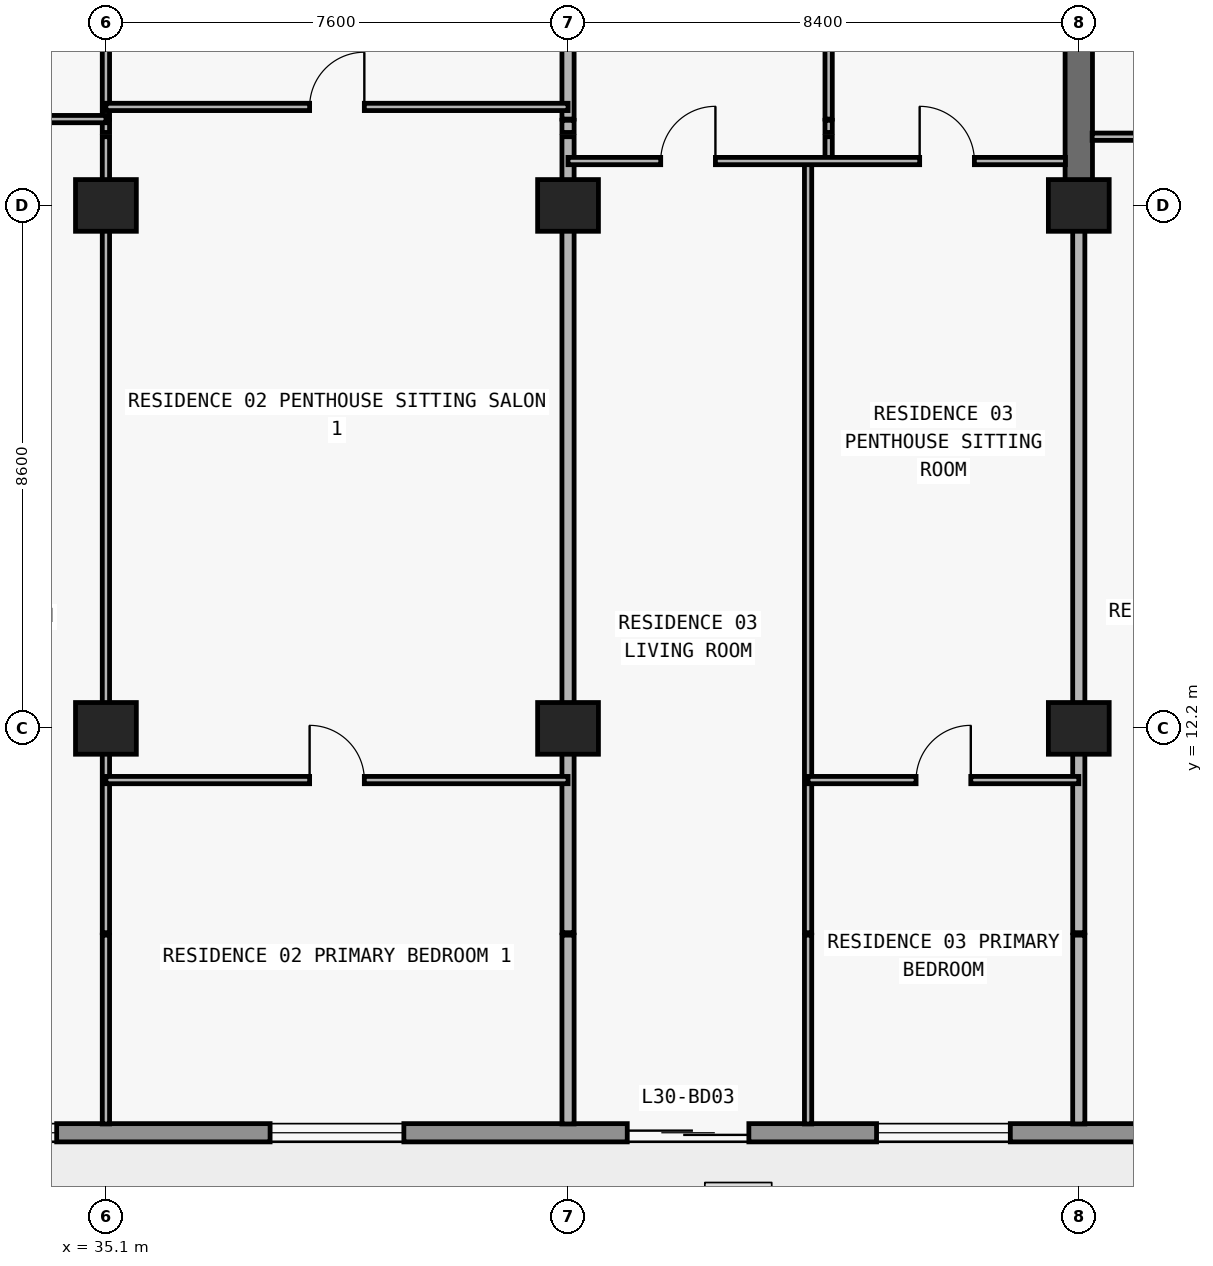
"""IFC4 building model, lengths in metres.
Left out: names, types, materials, properties, quantities, classifications, styles, units other than length and angle.
Written with IfcOpenShell. Run it as: python <this file> out.ifc"""

import sys

from ifc_helpers import new_model, si_unit, direction, frame, frame_2d, origin, origin_2d, place, context, subcontext, project, spatial, rectangle, extrude, element, fill, save


model = new_model("IFC4")
c1 = context("Model", 3, precision=1e-05, world=origin(), true_north=direction((0.0, 1.0)))
c2 = subcontext(c1, "Body", "Model", "MODEL_VIEW")
j1 = project(units=[si_unit("LENGTHUNIT", "METRE"), si_unit("PLANEANGLEUNIT", "RADIAN")], contexts=[c1])
p1 = place(None, origin())
s1 = spatial("IfcSite", under=j1, at=p1, CompositionType="ELEMENT")
p2 = place(p1, origin())
s2 = spatial("IfcBuilding", under=s1, at=p2, CompositionType="ELEMENT")
p3 = place(p2, frame((0.0, 0.0, 112.5)))
s3 = spatial("IfcBuildingStorey", under=s2, at=p3, CompositionType="ELEMENT", Elevation=112.5)
for number, where, z_axis, x_axis in (
    (1, (35.1, 12.2, 0.0), (0.0, 0.0, 1.0), (1.0, 0.0, 0.0)),
    (2, (42.7, 12.2, 0.0), (0.0, 0.0, 1.0), (1.0, 0.0, 0.0)),
    (3, (51.1, 12.2, 0.0), (0.0, 0.0, 1.0), (1.0, 0.0, 0.0)),
    (4, (35.1, 20.8, 0.0), (0.0, 0.0, 1.0), (1.0, 0.0, 0.0)),
    (5, (42.7, 20.8, 0.0), (0.0, 0.0, 1.0), (1.0, 0.0, 0.0)),
    (6, (51.1, 20.8, 0.0), (0.0, 0.0, 1.0), (1.0, 0.0, 0.0)),
):
    element("IfcColumn", number, at=place(p3, frame(where, z_axis=z_axis, x_axis=x_axis)), inside=s3, PredefinedType="COLUMN", context=c2, shape_type="SweptSolid", body=[
        extrude(rectangle(XDim=1.0, YDim=0.85, at=origin_2d()), origin(), (0.0, 0.0, 1.0), 3.05),
    ])
p4 = place(p3, frame((51.1, 20.8, 0.0), z_axis=(0.0, 0.0, 1.0), x_axis=(0.0, 1.0, 0.0)))
e7 = element("IfcWall", 7, at=p4, inside=s3, PredefinedType="SHEAR", context=c2, shape_type="SweptSolid", body=[
    extrude(rectangle(XDim=8.6, YDim=0.45, at=frame_2d((4.3, 0.0))), origin(), (0.0, 0.0, 1.0), 3.05),
])
p5 = place(p3, frame((70.1, 5.55, 0.0), z_axis=(0.0, 0.0, 1.0), x_axis=(-1.0, 0.0, 0.0)))
e8 = element("IfcWall", 8, at=p5, inside=s3, PredefinedType="STANDARD", context=c2, shape_type="SweptSolid", body=[
    extrude(rectangle(XDim=62.4, YDim=0.3, at=frame_2d((31.2, 0.0))), origin(), (0.0, 0.0, 1.0), 3.05),
])
p6 = place(p5, frame((57.29, 0.0, 0.0)))
e9 = element("IfcOpeningElement", 9, at=p6, cuts=e8, PredefinedType="OPENING", context=c2, shape_type="SweptSolid", body=[
    extrude(rectangle(XDim=2.0, YDim=2.3, at=frame_2d((1.0, 1.15))), frame((0.0, 0.16, 0.0), z_axis=(0.0, -1.0, 0.0), x_axis=(1.0, 0.0, 0.0)), (0.0, 0.0, 1.0), 0.32),
])
p7 = place(p5, frame((52.61, 0.0, 0.65)))
e10 = element("IfcOpeningElement", 10, at=p7, cuts=e8, PredefinedType="OPENING", context=c2, shape_type="SweptSolid", body=[
    extrude(rectangle(XDim=2.6, YDim=1.85, at=frame_2d((1.3, 0.925))), frame((0.0, 0.16, 0.0), z_axis=(0.0, -1.0, 0.0), x_axis=(1.0, 0.0, 0.0)), (0.0, 0.0, 1.0), 0.32),
])
p8 = place(p5, frame((46.5, 0.0, 0.85)))
e11 = element("IfcOpeningElement", 11, at=p8, cuts=e8, PredefinedType="OPENING", context=c2, shape_type="SweptSolid", body=[
    extrude(rectangle(XDim=2.2, YDim=1.55, at=frame_2d((1.1, 0.775))), frame((0.0, 0.16, 0.0), z_axis=(0.0, -1.0, 0.0), x_axis=(1.0, 0.0, 0.0)), (0.0, 0.0, 1.0), 0.32),
])
p9 = place(p5, frame((40.49, 0.0, 0.0)))
e12 = element("IfcOpeningElement", 12, at=p9, cuts=e8, PredefinedType="OPENING", context=c2, shape_type="SweptSolid", body=[
    extrude(rectangle(XDim=2.0, YDim=2.3, at=frame_2d((1.0, 1.15))), frame((0.0, 0.16, 0.0), z_axis=(0.0, -1.0, 0.0), x_axis=(1.0, 0.0, 0.0)), (0.0, 0.0, 1.0), 0.32),
])
p10 = place(p5, frame((35.81, 0.0, 0.65)))
e13 = element("IfcOpeningElement", 13, at=p10, cuts=e8, PredefinedType="OPENING", context=c2, shape_type="SweptSolid", body=[
    extrude(rectangle(XDim=2.6, YDim=1.85, at=frame_2d((1.3, 0.925))), frame((0.0, 0.16, 0.0), z_axis=(0.0, -1.0, 0.0), x_axis=(1.0, 0.0, 0.0)), (0.0, 0.0, 1.0), 0.32),
])
p11 = place(p5, frame((30.1, 0.0, 0.85)))
e14 = element("IfcOpeningElement", 14, at=p11, cuts=e8, PredefinedType="OPENING", context=c2, shape_type="SweptSolid", body=[
    extrude(rectangle(XDim=2.2, YDim=1.55, at=frame_2d((1.1, 0.775))), frame((0.0, 0.16, 0.0), z_axis=(0.0, -1.0, 0.0), x_axis=(1.0, 0.0, 0.0)), (0.0, 0.0, 1.0), 0.32),
])
p12 = place(p5, frame((24.426, 0.0, 0.0)))
e15 = element("IfcOpeningElement", 15, at=p12, cuts=e8, PredefinedType="OPENING", context=c2, shape_type="SweptSolid", body=[
    extrude(rectangle(XDim=2.0, YDim=2.3, at=frame_2d((1.0, 1.15))), frame((0.0, 0.16, 0.0), z_axis=(0.0, -1.0, 0.0), x_axis=(1.0, 0.0, 0.0)), (0.0, 0.0, 1.0), 0.32),
])
p13 = place(p5, frame((20.126, 0.0, 0.85)))
e16 = element("IfcOpeningElement", 16, at=p13, cuts=e8, PredefinedType="OPENING", context=c2, shape_type="SweptSolid", body=[
    extrude(rectangle(XDim=2.2, YDim=1.55, at=frame_2d((1.1, 0.775))), frame((0.0, 0.16, 0.0), z_axis=(0.0, -1.0, 0.0), x_axis=(1.0, 0.0, 0.0)), (0.0, 0.0, 1.0), 0.32),
])
p14 = place(p5, frame((15.69, 0.0, 0.0)))
e17 = element("IfcOpeningElement", 17, at=p14, cuts=e8, PredefinedType="OPENING", context=c2, shape_type="SweptSolid", body=[
    extrude(rectangle(XDim=2.0, YDim=2.3, at=frame_2d((1.0, 1.15))), frame((0.0, 0.16, 0.0), z_axis=(0.0, -1.0, 0.0), x_axis=(1.0, 0.0, 0.0)), (0.0, 0.0, 1.0), 0.32),
])
p15 = place(p5, frame((11.59, 0.0, 0.85)))
e18 = element("IfcOpeningElement", 18, at=p15, cuts=e8, PredefinedType="OPENING", context=c2, shape_type="SweptSolid", body=[
    extrude(rectangle(XDim=1.8, YDim=1.55, at=frame_2d((0.9, 0.775))), frame((0.0, 0.16, 0.0), z_axis=(0.0, -1.0, 0.0), x_axis=(1.0, 0.0, 0.0)), (0.0, 0.0, 1.0), 0.32),
])
p16 = place(p5, frame((7.626, 0.0, 0.0)))
e19 = element("IfcOpeningElement", 19, at=p16, cuts=e8, PredefinedType="OPENING", context=c2, shape_type="SweptSolid", body=[
    extrude(rectangle(XDim=2.0, YDim=2.3, at=frame_2d((1.0, 1.15))), frame((0.0, 0.16, 0.0), z_axis=(0.0, -1.0, 0.0), x_axis=(1.0, 0.0, 0.0)), (0.0, 0.0, 1.0), 0.32),
])
p17 = place(p5, frame((3.326, 0.0, 0.85)))
e20 = element("IfcOpeningElement", 20, at=p17, cuts=e8, PredefinedType="OPENING", context=c2, shape_type="SweptSolid", body=[
    extrude(rectangle(XDim=2.2, YDim=1.55, at=frame_2d((1.1, 0.775))), frame((0.0, 0.16, 0.0), z_axis=(0.0, -1.0, 0.0), x_axis=(1.0, 0.0, 0.0)), (0.0, 0.0, 1.0), 0.32),
])
p18 = place(p3, frame((35.1, 5.695, 0.0), z_axis=(0.0, 0.0, 1.0), x_axis=(0.0, 1.0, 0.0)))
e21 = element("IfcWall", 21, at=p18, inside=s3, PredefinedType="PARTITIONING", context=c2, shape_type="SweptSolid", body=[
    extrude(rectangle(XDim=3.105, YDim=0.12, at=frame_2d((1.552, 0.0))), origin(), (0.0, 0.0, 1.0), 3.05),
])
p19 = place(p3, frame((35.1, 8.84, 0.0), z_axis=(0.0, 0.0, 1.0), x_axis=(0.0, 1.0, 0.0)))
e22 = element("IfcWall", 22, at=p19, inside=s3, PredefinedType="PARTITIONING", context=c2, shape_type="SweptSolid", body=[
    extrude(rectangle(XDim=13.09, YDim=0.12, at=frame_2d((6.545, 0.0))), origin(), (0.0, 0.0, 1.0), 2.174),
])
p20 = place(p3, frame((35.1, 22.0, 0.0), z_axis=(0.0, 0.0, 1.0), x_axis=(0.0, 1.0, 0.0)))
e23 = element("IfcWall", 23, at=p20, inside=s3, PredefinedType="PARTITIONING", context=c2, shape_type="SweptSolid", body=[
    extrude(rectangle(XDim=0.2, YDim=0.12, at=frame_2d((0.1, 0.0))), origin(), (0.0, 0.0, 1.0), 2.174),
])
p21 = place(p3, frame((35.1, 22.22, 0.0), z_axis=(0.0, 0.0, 1.0), x_axis=(0.0, 1.0, 0.0)))
e24 = element("IfcWall", 24, at=p21, inside=s3, PredefinedType="PARTITIONING", context=c2, shape_type="SweptSolid", body=[
    extrude(rectangle(XDim=4.38, YDim=0.12, at=frame_2d((2.19, 0.0))), origin(), (0.0, 0.0, 1.0), 2.174),
])
p22 = place(p21, frame((1.84, 0.0, 0.0)))
e25 = element("IfcOpeningElement", 25, at=p22, cuts=e24, PredefinedType="OPENING", context=c2, shape_type="SweptSolid", body=[
    extrude(rectangle(XDim=0.9, YDim=2.124, at=frame_2d((0.45, 1.062))), frame((0.0, 0.07, 0.0), z_axis=(0.0, -1.0, 0.0), x_axis=(1.0, 0.0, 0.0)), (0.0, 0.0, 1.0), 0.14),
])
p23 = place(p3, frame((42.7, 5.695, 0.0), z_axis=(0.0, 0.0, 1.0), x_axis=(0.0, 1.0, 0.0)))
e26 = element("IfcWall", 26, at=p23, inside=s3, PredefinedType="PARTITIONING", context=c2, shape_type="SweptSolid", body=[
    extrude(rectangle(XDim=3.105, YDim=0.2, at=frame_2d((1.552, 0.0))), origin(), (0.0, 0.0, 1.0), 3.05),
])
p24 = place(p3, frame((42.7, 8.84, 0.0), z_axis=(0.0, 0.0, 1.0), x_axis=(0.0, 1.0, 0.0)))
e27 = element("IfcWall", 27, at=p24, inside=s3, PredefinedType="PARTITIONING", context=c2, shape_type="SweptSolid", body=[
    extrude(rectangle(XDim=13.09, YDim=0.2, at=frame_2d((6.545, 0.0))), origin(), (0.0, 0.0, 1.0), 2.174),
])
p25 = place(p3, frame((42.7, 22.0, 0.0), z_axis=(0.0, 0.0, 1.0), x_axis=(0.0, 1.0, 0.0)))
e28 = element("IfcWall", 28, at=p25, inside=s3, PredefinedType="PARTITIONING", context=c2, shape_type="SweptSolid", body=[
    extrude(rectangle(XDim=0.2, YDim=0.2, at=frame_2d((0.1, 0.0))), origin(), (0.0, 0.0, 1.0), 2.174),
])
p26 = place(p3, frame((42.7, 22.22, 0.0), z_axis=(0.0, 0.0, 1.0), x_axis=(0.0, 1.0, 0.0)))
e29 = element("IfcWall", 29, at=p26, inside=s3, PredefinedType="PARTITIONING", context=c2, shape_type="SweptSolid", body=[
    extrude(rectangle(XDim=4.38, YDim=0.2, at=frame_2d((2.19, 0.0))), origin(), (0.0, 0.0, 1.0), 2.174),
])
p27 = place(p3, frame((46.648, 5.695, 0.0), z_axis=(0.0, 0.0, 1.0), x_axis=(0.0, 1.0, 0.0)))
e30 = element("IfcWall", 30, at=p27, inside=s3, PredefinedType="PARTITIONING", context=c2, shape_type="SweptSolid", body=[
    extrude(rectangle(XDim=3.105, YDim=0.12, at=frame_2d((1.552, 0.0))), origin(), (0.0, 0.0, 1.0), 3.05),
])
p28 = place(p3, frame((46.648, 8.84, 0.0), z_axis=(0.0, 0.0, 1.0), x_axis=(0.0, 1.0, 0.0)))
e31 = element("IfcWall", 31, at=p28, inside=s3, PredefinedType="PARTITIONING", context=c2, shape_type="SweptSolid", body=[
    extrude(rectangle(XDim=12.69, YDim=0.12, at=frame_2d((6.345, 0.0))), origin(), (0.0, 0.0, 1.0), 3.05),
])
p29 = place(p3, frame((46.986, 21.53, 0.0), z_axis=(0.0, 0.0, 1.0), x_axis=(0.0, 1.0, 0.0)))
e32 = element("IfcWall", 32, at=p29, inside=s3, PredefinedType="PARTITIONING", context=c2, shape_type="SweptSolid", body=[
    extrude(rectangle(XDim=0.4, YDim=0.12, at=frame_2d((0.2, 0.0))), origin(), (0.0, 0.0, 1.0), 3.05),
])
p30 = place(p3, frame((46.986, 22.0, 0.0), z_axis=(0.0, 0.0, 1.0), x_axis=(0.0, 1.0, 0.0)))
e33 = element("IfcWall", 33, at=p30, inside=s3, PredefinedType="PARTITIONING", context=c2, shape_type="SweptSolid", body=[
    extrude(rectangle(XDim=0.2, YDim=0.12, at=frame_2d((0.1, 0.0))), origin(), (0.0, 0.0, 1.0), 3.05),
])
p31 = place(p3, frame((46.986, 22.22, 0.0), z_axis=(0.0, 0.0, 1.0), x_axis=(0.0, 1.0, 0.0)))
e34 = element("IfcWall", 34, at=p31, inside=s3, PredefinedType="PARTITIONING", context=c2, shape_type="SweptSolid", body=[
    extrude(rectangle(XDim=4.38, YDim=0.12, at=frame_2d((2.19, 0.0))), origin(), (0.0, 0.0, 1.0), 3.05),
])
p32 = place(p31, frame((1.74, 0.0, 0.0)))
e35 = element("IfcOpeningElement", 35, at=p32, cuts=e34, PredefinedType="OPENING", context=c2, shape_type="SweptSolid", body=[
    extrude(rectangle(XDim=0.9, YDim=2.15, at=frame_2d((0.45, 1.075))), frame((0.0, 0.07, 0.0), z_axis=(0.0, -1.0, 0.0), x_axis=(1.0, 0.0, 0.0)), (0.0, 0.0, 1.0), 0.14),
])
p33 = place(p3, frame((51.1, 5.695, 0.0), z_axis=(0.0, 0.0, 1.0), x_axis=(0.0, 1.0, 0.0)))
e36 = element("IfcWall", 36, at=p33, inside=s3, PredefinedType="PARTITIONING", context=c2, shape_type="SweptSolid", body=[
    extrude(rectangle(XDim=3.105, YDim=0.2, at=frame_2d((1.552, 0.0))), origin(), (0.0, 0.0, 1.0), 3.05),
])
p34 = place(p3, frame((51.1, 8.84, 0.0), z_axis=(0.0, 0.0, 1.0), x_axis=(0.0, 1.0, 0.0)))
e37 = element("IfcWall", 37, at=p34, inside=s3, PredefinedType="PARTITIONING", context=c2, shape_type="SweptSolid", body=[
    extrude(rectangle(XDim=11.955, YDim=0.2, at=frame_2d((5.978, 0.0))), origin(), (0.0, 0.0, 1.0), 2.174),
])
p35 = place(p3, frame((35.1, 11.35, 0.0), z_axis=(0.0, 0.0, 1.0), x_axis=(1.0, 0.0, 0.0)))
e38 = element("IfcWall", 38, at=p35, inside=s3, PredefinedType="PARTITIONING", context=c2, shape_type="SweptSolid", body=[
    extrude(rectangle(XDim=7.6, YDim=0.12, at=frame_2d((3.8, 0.0))), origin(), (0.0, 0.0, 1.0), 3.05),
])
p36 = place(p35, frame((3.35, 0.0, 0.0)))
e39 = element("IfcOpeningElement", 39, at=p36, cuts=e38, PredefinedType="OPENING", context=c2, shape_type="SweptSolid", body=[
    extrude(rectangle(XDim=0.9, YDim=2.15, at=frame_2d((0.45, 1.075))), frame((0.0, 0.07, 0.0), z_axis=(0.0, -1.0, 0.0), x_axis=(1.0, 0.0, 0.0)), (0.0, 0.0, 1.0), 0.14),
])
p37 = place(p3, frame((46.648, 11.35, 0.0), z_axis=(0.0, 0.0, 1.0), x_axis=(1.0, 0.0, 0.0)))
e40 = element("IfcWall", 40, at=p37, inside=s3, PredefinedType="PARTITIONING", context=c2, shape_type="SweptSolid", body=[
    extrude(rectangle(XDim=4.452, YDim=0.12, at=frame_2d((2.226, 0.0))), origin(), (0.0, 0.0, 1.0), 3.05),
])
p38 = place(p37, frame((1.776, 0.0, 0.0)))
e41 = element("IfcOpeningElement", 41, at=p38, cuts=e40, PredefinedType="OPENING", context=c2, shape_type="SweptSolid", body=[
    extrude(rectangle(XDim=0.9, YDim=2.15, at=frame_2d((0.45, 1.075))), frame((0.0, 0.07, 0.0), z_axis=(0.0, -1.0, 0.0), x_axis=(1.0, 0.0, 0.0)), (0.0, 0.0, 1.0), 0.14),
])
p39 = place(p3, frame((42.7, 21.53, 0.0), z_axis=(0.0, 0.0, 1.0), x_axis=(1.0, 0.0, 0.0)))
e42 = element("IfcWall", 42, at=p39, inside=s3, PredefinedType="PARTITIONING", context=c2, shape_type="SweptSolid", body=[
    extrude(rectangle(XDim=8.18, YDim=0.12, at=frame_2d((4.09, 0.0))), origin(), (0.0, 0.0, 1.0), 3.05),
])
p40 = place(p39, frame((1.524, 0.0, 0.0)))
e43 = element("IfcOpeningElement", 43, at=p40, cuts=e42, PredefinedType="OPENING", context=c2, shape_type="SweptSolid", body=[
    extrude(rectangle(XDim=0.9, YDim=2.15, at=frame_2d((0.45, 1.075))), frame((0.0, 0.07, 0.0), z_axis=(0.0, -1.0, 0.0), x_axis=(1.0, 0.0, 0.0)), (0.0, 0.0, 1.0), 0.14),
])
p41 = place(p39, frame((5.783, 0.0, 0.0)))
e44 = element("IfcOpeningElement", 44, at=p41, cuts=e42, PredefinedType="OPENING", context=c2, shape_type="SweptSolid", body=[
    extrude(rectangle(XDim=0.9, YDim=2.15, at=frame_2d((0.45, 1.075))), frame((0.0, 0.07, 0.0), z_axis=(0.0, -1.0, 0.0), x_axis=(1.0, 0.0, 0.0)), (0.0, 0.0, 1.0), 0.14),
])
p42 = place(p3, frame((51.32, 21.93, 0.0), z_axis=(0.0, 0.0, 1.0), x_axis=(1.0, 0.0, 0.0)))
e45 = element("IfcWall", 45, at=p42, inside=s3, PredefinedType="PARTITIONING", context=c2, shape_type="SweptSolid", body=[
    extrude(rectangle(XDim=8.18, YDim=0.12, at=frame_2d((4.09, 0.0))), origin(), (0.0, 0.0, 1.0), 3.05),
])
p43 = place(p42, frame((1.708, 0.0, 0.0)))
e46 = element("IfcOpeningElement", 46, at=p43, cuts=e45, PredefinedType="OPENING", context=c2, shape_type="SweptSolid", body=[
    extrude(rectangle(XDim=0.9, YDim=2.15, at=frame_2d((0.45, 1.075))), frame((0.0, 0.07, 0.0), z_axis=(0.0, -1.0, 0.0), x_axis=(1.0, 0.0, 0.0)), (0.0, 0.0, 1.0), 0.14),
])
p44 = place(p42, frame((5.84, 0.0, 0.0)))
e47 = element("IfcOpeningElement", 47, at=p44, cuts=e45, PredefinedType="OPENING", context=c2, shape_type="SweptSolid", body=[
    extrude(rectangle(XDim=0.9, YDim=2.15, at=frame_2d((0.45, 1.075))), frame((0.0, 0.07, 0.0), z_axis=(0.0, -1.0, 0.0), x_axis=(1.0, 0.0, 0.0)), (0.0, 0.0, 1.0), 0.14),
])
p45 = place(p3, frame((26.92, 22.22, 0.0), z_axis=(0.0, 0.0, 1.0), x_axis=(1.0, 0.0, 0.0)))
e48 = element("IfcWall", 48, at=p45, inside=s3, PredefinedType="PARTITIONING", context=c2, shape_type="SweptSolid", body=[
    extrude(rectangle(XDim=8.18, YDim=0.12, at=frame_2d((4.09, 0.0))), origin(), (0.0, 0.0, 1.0), 3.05),
])
p46 = place(p45, frame((1.204, 0.0, 0.0)))
e49 = element("IfcOpeningElement", 49, at=p46, cuts=e48, PredefinedType="OPENING", context=c2, shape_type="SweptSolid", body=[
    extrude(rectangle(XDim=0.9, YDim=2.15, at=frame_2d((0.45, 1.075))), frame((0.0, 0.07, 0.0), z_axis=(0.0, -1.0, 0.0), x_axis=(1.0, 0.0, 0.0)), (0.0, 0.0, 1.0), 0.14),
])
p47 = place(p3, frame((35.1, 22.42, 0.0), z_axis=(0.0, 0.0, 1.0), x_axis=(1.0, 0.0, 0.0)))
e50 = element("IfcWall", 50, at=p47, inside=s3, PredefinedType="PARTITIONING", context=c2, shape_type="SweptSolid", body=[
    extrude(rectangle(XDim=7.6, YDim=0.12, at=frame_2d((3.8, 0.0))), origin(), (0.0, 0.0, 1.0), 3.05),
])
p48 = place(p47, frame((3.35, 0.0, 0.0)))
e51 = element("IfcOpeningElement", 51, at=p48, cuts=e50, PredefinedType="OPENING", context=c2, shape_type="SweptSolid", body=[
    extrude(rectangle(XDim=0.9, YDim=2.15, at=frame_2d((0.45, 1.075))), frame((0.0, 0.07, 0.0), z_axis=(0.0, -1.0, 0.0), x_axis=(1.0, 0.0, 0.0)), (0.0, 0.0, 1.0), 0.14),
])
p49 = place(p10, origin())
e52 = element("IfcWindow", 52, at=p49, inside=s3, PartitioningType="SINGLE_PANEL", PredefinedType="WINDOW", context=c2, shape_type="SweptSolid", body=[
    extrude(rectangle(XDim=2.6, YDim=1.85, at=frame_2d((1.3, 0.925))), frame((0.0, 0.03, 0.0), z_axis=(0.0, -1.0, 0.0), x_axis=(1.0, 0.0, 0.0)), (0.0, 0.0, 1.0), 0.06),
])
fill(e13, e52)
p50 = place(p11, origin())
e53 = element("IfcWindow", 53, at=p50, inside=s3, PartitioningType="SINGLE_PANEL", PredefinedType="WINDOW", context=c2, shape_type="SweptSolid", body=[
    extrude(rectangle(XDim=2.2, YDim=1.55, at=frame_2d((1.1, 0.775))), frame((0.0, 0.03, 0.0), z_axis=(0.0, -1.0, 0.0), x_axis=(1.0, 0.0, 0.0)), (0.0, 0.0, 1.0), 0.06),
])
fill(e14, e53)
p51 = place(p12, origin())
e54 = element("IfcDoor", 54, at=p51, inside=s3, OperationType="DOUBLE_DOOR_SLIDING", PredefinedType="DOOR", context=c2, shape_type="SweptSolid", body=[
    extrude(rectangle(XDim=2.0, YDim=2.3, at=frame_2d((1.0, 1.15))), frame((0.0, 0.025, 0.0), z_axis=(0.0, -1.0, 0.0), x_axis=(1.0, 0.0, 0.0)), (0.0, 0.0, 1.0), 0.05),
])
fill(e15, e54)
p52 = place(p13, origin())
e55 = element("IfcWindow", 55, at=p52, inside=s3, PartitioningType="SINGLE_PANEL", PredefinedType="WINDOW", context=c2, shape_type="SweptSolid", body=[
    extrude(rectangle(XDim=2.2, YDim=1.55, at=frame_2d((1.1, 0.775))), frame((0.0, 0.03, 0.0), z_axis=(0.0, -1.0, 0.0), x_axis=(1.0, 0.0, 0.0)), (0.0, 0.0, 1.0), 0.06),
])
fill(e16, e55)
p53 = place(p48, origin())
e56 = element("IfcDoor", 56, at=p53, inside=s3, OperationType="SINGLE_SWING_RIGHT", PredefinedType="DOOR", context=c2, shape_type="SweptSolid", body=[
    extrude(rectangle(XDim=0.9, YDim=2.15, at=frame_2d((0.45, 1.075))), frame((0.0, 0.025, 0.0), z_axis=(0.0, -1.0, 0.0), x_axis=(1.0, 0.0, 0.0)), (0.0, 0.0, 1.0), 0.05),
])
fill(e51, e56)
p54 = place(p36, origin())
e57 = element("IfcDoor", 57, at=p54, inside=s3, OperationType="SINGLE_SWING_LEFT", PredefinedType="DOOR", context=c2, shape_type="SweptSolid", body=[
    extrude(rectangle(XDim=0.9, YDim=2.15, at=frame_2d((0.45, 1.075))), frame((0.0, 0.025, 0.0), z_axis=(0.0, -1.0, 0.0), x_axis=(1.0, 0.0, 0.0)), (0.0, 0.0, 1.0), 0.05),
])
fill(e39, e57)
p55 = place(p40, origin())
e58 = element("IfcDoor", 58, at=p55, inside=s3, OperationType="SINGLE_SWING_RIGHT", PredefinedType="DOOR", context=c2, shape_type="SweptSolid", body=[
    extrude(rectangle(XDim=0.9, YDim=2.15, at=frame_2d((0.45, 1.075))), frame((0.0, 0.025, 0.0), z_axis=(0.0, -1.0, 0.0), x_axis=(1.0, 0.0, 0.0)), (0.0, 0.0, 1.0), 0.05),
])
fill(e43, e58)
p56 = place(p41, origin())
e59 = element("IfcDoor", 59, at=p56, inside=s3, OperationType="SINGLE_SWING_LEFT", PredefinedType="DOOR", context=c2, shape_type="SweptSolid", body=[
    extrude(rectangle(XDim=0.9, YDim=2.15, at=frame_2d((0.45, 1.075))), frame((0.0, 0.025, 0.0), z_axis=(0.0, -1.0, 0.0), x_axis=(1.0, 0.0, 0.0)), (0.0, 0.0, 1.0), 0.05),
])
fill(e44, e59)
p57 = place(p38, origin())
e60 = element("IfcDoor", 60, at=p57, inside=s3, OperationType="SINGLE_SWING_RIGHT", PredefinedType="DOOR", context=c2, shape_type="SweptSolid", body=[
    extrude(rectangle(XDim=0.9, YDim=2.15, at=frame_2d((0.45, 1.075))), frame((0.0, 0.025, 0.0), z_axis=(0.0, -1.0, 0.0), x_axis=(1.0, 0.0, 0.0)), (0.0, 0.0, 1.0), 0.05),
])
fill(e41, e60)
save(model, sys.argv[1])
